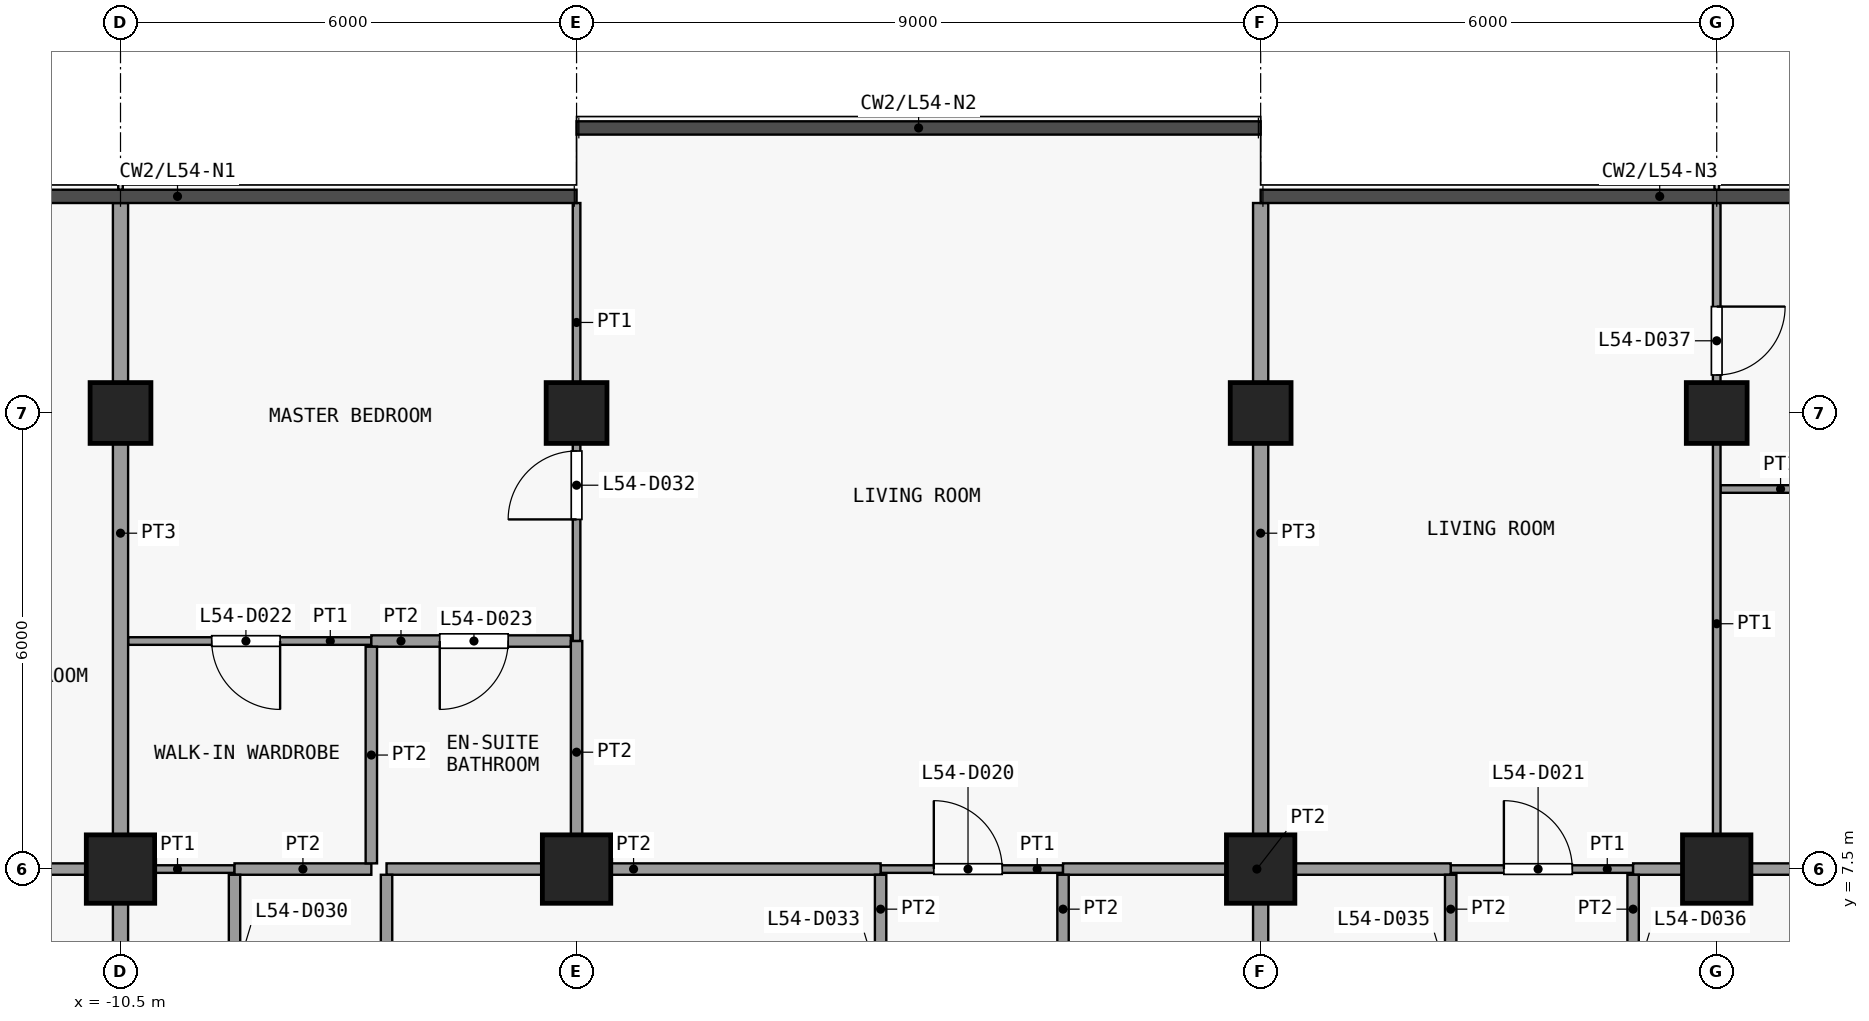
"""IFC4 building model, lengths in metres.
Left out: names, types, materials, properties, quantities, classifications, styles, units other than length and angle.
Written with IfcOpenShell. Run it as: python <this file> out.ifc"""

import sys

from ifc_helpers import new_model, si_unit, direction, frame, frame_2d, origin, origin_2d, place, context, subcontext, project, spatial, rectangle, extrude, element, fill, save


model = new_model("IFC4")
c1 = context("Model", 3, precision=1e-05, world=origin(), true_north=direction((0.0, 1.0)))
c2 = subcontext(c1, "Body", "Model", "MODEL_VIEW")
j1 = project(units=[si_unit("LENGTHUNIT", "METRE"), si_unit("PLANEANGLEUNIT", "RADIAN")], contexts=[c1])
p1 = place(None, origin())
s1 = spatial("IfcSite", under=j1, at=p1, CompositionType="ELEMENT")
p2 = place(p1, origin())
s2 = spatial("IfcBuilding", under=s1, at=p2, CompositionType="ELEMENT")
p3 = place(p2, frame((0.0, 0.0, 215.9)))
s3 = spatial("IfcBuildingStorey", under=s2, at=p3, CompositionType="ELEMENT", Elevation=215.9)
p4 = place(p3, frame((-10.5, 7.5, 0.0), z_axis=(0.0, 0.0, 1.0), x_axis=(1.0, 0.0, 0.0)))
e1 = element("IfcColumn", 1, at=p4, inside=s3, PredefinedType="COLUMN", context=c2, shape_type="SweptSolid", body=[
    extrude(rectangle(XDim=0.9, YDim=0.9, at=origin_2d()), origin(), (0.0, 0.0, 1.0), 3.6),
])
p5 = place(p3, frame((-10.5, 13.5, 0.0), z_axis=(0.0, 0.0, 1.0), x_axis=(1.0, 0.0, 0.0)))
e2 = element("IfcColumn", 2, at=p5, inside=s3, PredefinedType="COLUMN", context=c2, shape_type="SweptSolid", body=[
    extrude(rectangle(XDim=0.8, YDim=0.8, at=origin_2d()), origin(), (0.0, 0.0, 1.0), 3.6),
])
p6 = place(p3, frame((-4.5, 7.5, 0.0), z_axis=(0.0, 0.0, 1.0), x_axis=(1.0, 0.0, 0.0)))
e3 = element("IfcColumn", 3, at=p6, inside=s3, PredefinedType="COLUMN", context=c2, shape_type="SweptSolid", body=[
    extrude(rectangle(XDim=0.9, YDim=0.9, at=origin_2d()), origin(), (0.0, 0.0, 1.0), 3.6),
])
p7 = place(p3, frame((-4.5, 13.5, 0.0), z_axis=(0.0, 0.0, 1.0), x_axis=(1.0, 0.0, 0.0)))
e4 = element("IfcColumn", 4, at=p7, inside=s3, PredefinedType="COLUMN", context=c2, shape_type="SweptSolid", body=[
    extrude(rectangle(XDim=0.8, YDim=0.8, at=origin_2d()), origin(), (0.0, 0.0, 1.0), 3.6),
])
p8 = place(p3, frame((4.5, 7.5, 0.0), z_axis=(0.0, 0.0, 1.0), x_axis=(1.0, 0.0, 0.0)))
e5 = element("IfcColumn", 5, at=p8, inside=s3, PredefinedType="COLUMN", context=c2, shape_type="SweptSolid", body=[
    extrude(rectangle(XDim=0.9, YDim=0.9, at=origin_2d()), origin(), (0.0, 0.0, 1.0), 3.6),
])
p9 = place(p3, frame((4.5, 13.5, 0.0), z_axis=(0.0, 0.0, 1.0), x_axis=(1.0, 0.0, 0.0)))
e6 = element("IfcColumn", 6, at=p9, inside=s3, PredefinedType="COLUMN", context=c2, shape_type="SweptSolid", body=[
    extrude(rectangle(XDim=0.8, YDim=0.8, at=origin_2d()), origin(), (0.0, 0.0, 1.0), 3.6),
])
p10 = place(p3, frame((10.5, 7.5, 0.0), z_axis=(0.0, 0.0, 1.0), x_axis=(1.0, 0.0, 0.0)))
e7 = element("IfcColumn", 7, at=p10, inside=s3, PredefinedType="COLUMN", context=c2, shape_type="SweptSolid", body=[
    extrude(rectangle(XDim=0.9, YDim=0.9, at=origin_2d()), origin(), (0.0, 0.0, 1.0), 3.6),
])
p11 = place(p3, frame((10.5, 13.5, 0.0), z_axis=(0.0, 0.0, 1.0), x_axis=(1.0, 0.0, 0.0)))
e8 = element("IfcColumn", 8, at=p11, inside=s3, PredefinedType="COLUMN", context=c2, shape_type="SweptSolid", body=[
    extrude(rectangle(XDim=0.8, YDim=0.8, at=origin_2d()), origin(), (0.0, 0.0, 1.0), 3.6),
])
p12 = place(p3, frame((-10.5, 7.5, 0.0), z_axis=(0.0, 0.0, 1.0), x_axis=(1.0, 0.0, 0.0)))
e9 = element("IfcWall", 9, at=p12, inside=s3, PredefinedType="PARTITIONING", context=c2, shape_type="SweptSolid", body=[
    extrude(rectangle(XDim=1.5, YDim=0.1, at=frame_2d((0.75, 0.0))), origin(), (0.0, 0.0, 1.0), 3.3),
])
p13 = place(p3, frame((-0.5, 7.5, 0.0), z_axis=(0.0, 0.0, 1.0), x_axis=(1.0, 0.0, 0.0)))
e10 = element("IfcWall", 10, at=p13, inside=s3, PredefinedType="PARTITIONING", context=c2, shape_type="SweptSolid", body=[
    extrude(rectangle(XDim=2.4, YDim=0.1, at=frame_2d((1.2, 0.0))), origin(), (0.0, 0.0, 1.0), 3.3),
])
p14 = place(p13, frame((0.7, 0.0, 0.0)))
e11 = element("IfcOpeningElement", 11, at=p14, cuts=e10, PredefinedType="OPENING", context=c2, shape_type="SweptSolid", body=[
    extrude(rectangle(XDim=0.9, YDim=2.1, at=frame_2d((0.45, 1.05))), frame((0.0, 0.06, 0.0), z_axis=(0.0, -1.0, 0.0), x_axis=(1.0, 0.0, 0.0)), (0.0, 0.0, 1.0), 0.12),
])
p15 = place(p3, frame((7.0, 7.5, 0.0), z_axis=(0.0, 0.0, 1.0), x_axis=(1.0, 0.0, 0.0)))
e12 = element("IfcWall", 12, at=p15, inside=s3, PredefinedType="PARTITIONING", context=c2, shape_type="SweptSolid", body=[
    extrude(rectangle(XDim=2.4, YDim=0.1, at=frame_2d((1.2, 0.0))), origin(), (0.0, 0.0, 1.0), 3.3),
])
p16 = place(p15, frame((0.7, 0.0, 0.0)))
e13 = element("IfcOpeningElement", 13, at=p16, cuts=e12, PredefinedType="OPENING", context=c2, shape_type="SweptSolid", body=[
    extrude(rectangle(XDim=0.9, YDim=2.1, at=frame_2d((0.45, 1.05))), frame((0.0, 0.06, 0.0), z_axis=(0.0, -1.0, 0.0), x_axis=(1.0, 0.0, 0.0)), (0.0, 0.0, 1.0), 0.12),
])
p17 = place(p3, frame((-13.1, 7.5, 0.0), z_axis=(0.0, 0.0, 1.0), x_axis=(1.0, 0.0, 0.0)))
e14 = element("IfcWall", 14, at=p17, inside=s3, PredefinedType="PARTITIONING", context=c2, shape_type="SweptSolid", body=[
    extrude(rectangle(XDim=2.6, YDim=0.15, at=frame_2d((1.3, 0.0))), origin(), (0.0, 0.0, 1.0), 3.3),
])
p18 = place(p3, frame((-9.0, 7.5, 0.0), z_axis=(0.0, 0.0, 1.0), x_axis=(1.0, 0.0, 0.0)))
e15 = element("IfcWall", 15, at=p18, inside=s3, PredefinedType="PARTITIONING", context=c2, shape_type="SweptSolid", body=[
    extrude(rectangle(XDim=1.8, YDim=0.15, at=frame_2d((0.9, 0.0))), origin(), (0.0, 0.0, 1.0), 3.3),
])
p19 = place(p3, frame((-7.0, 7.5, 0.0), z_axis=(0.0, 0.0, 1.0), x_axis=(1.0, 0.0, 0.0)))
e16 = element("IfcWall", 16, at=p19, inside=s3, PredefinedType="PARTITIONING", context=c2, shape_type="SweptSolid", body=[
    extrude(rectangle(XDim=6.5, YDim=0.15, at=frame_2d((3.25, 0.0))), origin(), (0.0, 0.0, 1.0), 3.3),
])
p20 = place(p3, frame((1.9, 7.5, 0.0), z_axis=(0.0, 0.0, 1.0), x_axis=(1.0, 0.0, 0.0)))
e17 = element("IfcWall", 17, at=p20, inside=s3, PredefinedType="PARTITIONING", context=c2, shape_type="SweptSolid", body=[
    extrude(rectangle(XDim=5.1, YDim=0.15, at=frame_2d((2.55, 0.0))), origin(), (0.0, 0.0, 1.0), 3.3),
])
p21 = place(p3, frame((9.4, 7.5, 0.0), z_axis=(0.0, 0.0, 1.0), x_axis=(1.0, 0.0, 0.0)))
e18 = element("IfcWall", 18, at=p21, inside=s3, PredefinedType="PARTITIONING", context=c2, shape_type="SweptSolid", body=[
    extrude(rectangle(XDim=8.25, YDim=0.15, at=frame_2d((4.125, 0.0))), origin(), (0.0, 0.0, 1.0), 3.3),
])
p22 = place(p3, frame((-10.4, 10.5, 0.0), z_axis=(0.0, 0.0, 1.0), x_axis=(1.0, 0.0, 0.0)))
e19 = element("IfcWall", 19, at=p22, inside=s3, PredefinedType="PARTITIONING", context=c2, shape_type="SweptSolid", body=[
    extrude(rectangle(XDim=3.2, YDim=0.1, at=frame_2d((1.6, 0.0))), origin(), (0.0, 0.0, 1.0), 3.3),
])
p23 = place(p22, frame((1.1, 0.0, 0.0)))
e20 = element("IfcOpeningElement", 20, at=p23, cuts=e19, PredefinedType="OPENING", context=c2, shape_type="SweptSolid", body=[
    extrude(rectangle(XDim=0.9, YDim=2.1, at=frame_2d((0.45, 1.05))), frame((0.0, 0.06, 0.0), z_axis=(0.0, -1.0, 0.0), x_axis=(1.0, 0.0, 0.0)), (0.0, 0.0, 1.0), 0.12),
])
p24 = place(p3, frame((-7.2, 10.5, 0.0), z_axis=(0.0, 0.0, 1.0), x_axis=(1.0, 0.0, 0.0)))
e21 = element("IfcWall", 21, at=p24, inside=s3, PredefinedType="PARTITIONING", context=c2, shape_type="SweptSolid", body=[
    extrude(rectangle(XDim=2.625, YDim=0.15, at=frame_2d((1.312, 0.0))), origin(), (0.0, 0.0, 1.0), 3.3),
])
p25 = place(p24, frame((0.9, 0.0, 0.0)))
e22 = element("IfcOpeningElement", 22, at=p25, cuts=e21, PredefinedType="OPENING", context=c2, shape_type="SweptSolid", body=[
    extrude(rectangle(XDim=0.9, YDim=2.1, at=frame_2d((0.45, 1.05))), frame((0.0, 0.085, 0.0), z_axis=(0.0, -1.0, 0.0), x_axis=(1.0, 0.0, 0.0)), (0.0, 0.0, 1.0), 0.17),
])
p26 = place(p3, frame((10.55, 12.5, 0.0), z_axis=(0.0, 0.0, 1.0), x_axis=(1.0, 0.0, 0.0)))
e23 = element("IfcWall", 23, at=p26, inside=s3, PredefinedType="PARTITIONING", context=c2, shape_type="SweptSolid", body=[
    extrude(rectangle(XDim=4.3, YDim=0.1, at=frame_2d((2.15, 0.0))), origin(), (0.0, 0.0, 1.0), 3.3),
])
p27 = place(p26, frame((1.7, 0.0, 0.0)))
e24 = element("IfcOpeningElement", 24, at=p27, cuts=e23, PredefinedType="OPENING", context=c2, shape_type="SweptSolid", body=[
    extrude(rectangle(XDim=0.9, YDim=2.1, at=frame_2d((0.45, 1.05))), frame((0.0, 0.06, 0.0), z_axis=(0.0, -1.0, 0.0), x_axis=(1.0, 0.0, 0.0)), (0.0, 0.0, 1.0), 0.12),
])
p28 = place(p3, frame((-10.5, 4.6, 0.0), z_axis=(0.0, 0.0, 1.0), x_axis=(0.0, 1.0, 0.0)))
e25 = element("IfcWall", 25, at=p28, inside=s3, PredefinedType="PARTITIONING", context=c2, shape_type="SweptSolid", body=[
    extrude(rectangle(XDim=2.825, YDim=0.2, at=frame_2d((1.413, 0.0))), origin(), (0.0, 0.0, 1.0), 3.3),
])
p29 = place(p3, frame((-10.5, 7.575, 0.0), z_axis=(0.0, 0.0, 1.0), x_axis=(0.0, 1.0, 0.0)))
e26 = element("IfcWall", 26, at=p29, inside=s3, PredefinedType="PARTITIONING", context=c2, shape_type="SweptSolid", body=[
    extrude(rectangle(XDim=8.688, YDim=0.2, at=frame_2d((4.344, 0.0))), origin(), (0.0, 0.0, 1.0), 3.3),
])
p30 = place(p3, frame((-9.0, 4.6, 0.0), z_axis=(0.0, 0.0, 1.0), x_axis=(0.0, 1.0, 0.0)))
e27 = element("IfcWall", 27, at=p30, inside=s3, PredefinedType="PARTITIONING", context=c2, shape_type="SweptSolid", body=[
    extrude(rectangle(XDim=2.825, YDim=0.15, at=frame_2d((1.413, 0.0))), origin(), (0.0, 0.0, 1.0), 3.3),
])
p31 = place(p30, frame((1.0, 0.0, 0.0)))
e28 = element("IfcOpeningElement", 28, at=p31, cuts=e27, PredefinedType="OPENING", context=c2, shape_type="SweptSolid", body=[
    extrude(rectangle(XDim=0.9, YDim=2.1, at=frame_2d((0.45, 1.05))), frame((0.0, 0.085, 0.0), z_axis=(0.0, -1.0, 0.0), x_axis=(1.0, 0.0, 0.0)), (0.0, 0.0, 1.0), 0.17),
])
p32 = place(p3, frame((-7.2, 7.575, 0.0), z_axis=(0.0, 0.0, 1.0), x_axis=(0.0, 1.0, 0.0)))
e29 = element("IfcWall", 29, at=p32, inside=s3, PredefinedType="PARTITIONING", context=c2, shape_type="SweptSolid", body=[
    extrude(rectangle(XDim=2.85, YDim=0.15, at=frame_2d((1.425, 0.0))), origin(), (0.0, 0.0, 1.0), 3.3),
])
p33 = place(p3, frame((-7.0, 4.6, 0.0), z_axis=(0.0, 0.0, 1.0), x_axis=(0.0, 1.0, 0.0)))
e30 = element("IfcWall", 30, at=p33, inside=s3, PredefinedType="PARTITIONING", context=c2, shape_type="SweptSolid", body=[
    extrude(rectangle(XDim=2.825, YDim=0.15, at=frame_2d((1.413, 0.0))), origin(), (0.0, 0.0, 1.0), 3.3),
])
p34 = place(p33, frame((1.0, 0.0, 0.0)))
e31 = element("IfcOpeningElement", 31, at=p34, cuts=e30, PredefinedType="OPENING", context=c2, shape_type="SweptSolid", body=[
    extrude(rectangle(XDim=0.9, YDim=2.1, at=frame_2d((0.45, 1.05))), frame((0.0, 0.085, 0.0), z_axis=(0.0, -1.0, 0.0), x_axis=(1.0, 0.0, 0.0)), (0.0, 0.0, 1.0), 0.17),
])
p35 = place(p3, frame((-4.5, 10.5, 0.0), z_axis=(0.0, 0.0, 1.0), x_axis=(0.0, 1.0, 0.0)))
e32 = element("IfcWall", 32, at=p35, inside=s3, PredefinedType="PARTITIONING", context=c2, shape_type="SweptSolid", body=[
    extrude(rectangle(XDim=5.762, YDim=0.1, at=frame_2d((2.881, 0.0))), origin(), (0.0, 0.0, 1.0), 3.3),
])
p36 = place(p35, frame((1.6, 0.0, 0.0)))
e33 = element("IfcOpeningElement", 33, at=p36, cuts=e32, PredefinedType="OPENING", context=c2, shape_type="SweptSolid", body=[
    extrude(rectangle(XDim=0.9, YDim=2.1, at=frame_2d((0.45, 1.05))), frame((0.0, 0.06, 0.0), z_axis=(0.0, -1.0, 0.0), x_axis=(1.0, 0.0, 0.0)), (0.0, 0.0, 1.0), 0.12),
])
p37 = place(p3, frame((-4.5, 7.575, 0.0), z_axis=(0.0, 0.0, 1.0), x_axis=(0.0, 1.0, 0.0)))
e34 = element("IfcWall", 34, at=p37, inside=s3, PredefinedType="PARTITIONING", context=c2, shape_type="SweptSolid", body=[
    extrude(rectangle(XDim=2.925, YDim=0.15, at=frame_2d((1.462, 0.0))), origin(), (0.0, 0.0, 1.0), 3.3),
])
p38 = place(p3, frame((-0.5, 4.6, 0.0), z_axis=(0.0, 0.0, 1.0), x_axis=(0.0, 1.0, 0.0)))
e35 = element("IfcWall", 35, at=p38, inside=s3, PredefinedType="PARTITIONING", context=c2, shape_type="SweptSolid", body=[
    extrude(rectangle(XDim=2.825, YDim=0.15, at=frame_2d((1.413, 0.0))), origin(), (0.0, 0.0, 1.0), 3.3),
])
p39 = place(p38, frame((0.9, 0.0, 0.0)))
e36 = element("IfcOpeningElement", 36, at=p39, cuts=e35, PredefinedType="OPENING", context=c2, shape_type="SweptSolid", body=[
    extrude(rectangle(XDim=0.9, YDim=2.1, at=frame_2d((0.45, 1.05))), frame((0.0, 0.085, 0.0), z_axis=(0.0, -1.0, 0.0), x_axis=(1.0, 0.0, 0.0)), (0.0, 0.0, 1.0), 0.17),
])
p40 = place(p3, frame((1.9, 4.6, 0.0), z_axis=(0.0, 0.0, 1.0), x_axis=(0.0, 1.0, 0.0)))
e37 = element("IfcWall", 37, at=p40, inside=s3, PredefinedType="PARTITIONING", context=c2, shape_type="SweptSolid", body=[
    extrude(rectangle(XDim=2.825, YDim=0.15, at=frame_2d((1.413, 0.0))), origin(), (0.0, 0.0, 1.0), 3.3),
])
p41 = place(p40, frame((0.9, 0.0, 0.0)))
e38 = element("IfcOpeningElement", 38, at=p41, cuts=e37, PredefinedType="OPENING", context=c2, shape_type="SweptSolid", body=[
    extrude(rectangle(XDim=0.9, YDim=2.1, at=frame_2d((0.45, 1.05))), frame((0.0, 0.085, 0.0), z_axis=(0.0, -1.0, 0.0), x_axis=(1.0, 0.0, 0.0)), (0.0, 0.0, 1.0), 0.17),
])
p42 = place(p3, frame((4.5, 4.6, 0.0), z_axis=(0.0, 0.0, 1.0), x_axis=(0.0, 1.0, 0.0)))
e39 = element("IfcWall", 39, at=p42, inside=s3, PredefinedType="PARTITIONING", context=c2, shape_type="SweptSolid", body=[
    extrude(rectangle(XDim=2.825, YDim=0.2, at=frame_2d((1.413, 0.0))), origin(), (0.0, 0.0, 1.0), 3.3),
])
p43 = place(p3, frame((4.5, 7.575, 0.0), z_axis=(0.0, 0.0, 1.0), x_axis=(0.0, 1.0, 0.0)))
e40 = element("IfcWall", 40, at=p43, inside=s3, PredefinedType="PARTITIONING", context=c2, shape_type="SweptSolid", body=[
    extrude(rectangle(XDim=8.688, YDim=0.2, at=frame_2d((4.344, 0.0))), origin(), (0.0, 0.0, 1.0), 3.3),
])
p44 = place(p3, frame((7.0, 4.6, 0.0), z_axis=(0.0, 0.0, 1.0), x_axis=(0.0, 1.0, 0.0)))
e41 = element("IfcWall", 41, at=p44, inside=s3, PredefinedType="PARTITIONING", context=c2, shape_type="SweptSolid", body=[
    extrude(rectangle(XDim=2.825, YDim=0.15, at=frame_2d((1.413, 0.0))), origin(), (0.0, 0.0, 1.0), 3.3),
])
p45 = place(p44, frame((0.9, 0.0, 0.0)))
e42 = element("IfcOpeningElement", 42, at=p45, cuts=e41, PredefinedType="OPENING", context=c2, shape_type="SweptSolid", body=[
    extrude(rectangle(XDim=0.9, YDim=2.1, at=frame_2d((0.45, 1.05))), frame((0.0, 0.085, 0.0), z_axis=(0.0, -1.0, 0.0), x_axis=(1.0, 0.0, 0.0)), (0.0, 0.0, 1.0), 0.17),
])
p46 = place(p3, frame((9.4, 4.6, 0.0), z_axis=(0.0, 0.0, 1.0), x_axis=(0.0, 1.0, 0.0)))
e43 = element("IfcWall", 43, at=p46, inside=s3, PredefinedType="PARTITIONING", context=c2, shape_type="SweptSolid", body=[
    extrude(rectangle(XDim=2.825, YDim=0.15, at=frame_2d((1.413, 0.0))), origin(), (0.0, 0.0, 1.0), 3.3),
])
p47 = place(p46, frame((0.9, 0.0, 0.0)))
e44 = element("IfcOpeningElement", 44, at=p47, cuts=e43, PredefinedType="OPENING", context=c2, shape_type="SweptSolid", body=[
    extrude(rectangle(XDim=0.9, YDim=2.1, at=frame_2d((0.45, 1.05))), frame((0.0, 0.085, 0.0), z_axis=(0.0, -1.0, 0.0), x_axis=(1.0, 0.0, 0.0)), (0.0, 0.0, 1.0), 0.17),
])
p48 = place(p3, frame((10.5, 7.575, 0.0), z_axis=(0.0, 0.0, 1.0), x_axis=(0.0, 1.0, 0.0)))
e45 = element("IfcWall", 45, at=p48, inside=s3, PredefinedType="PARTITIONING", context=c2, shape_type="SweptSolid", body=[
    extrude(rectangle(XDim=8.688, YDim=0.1, at=frame_2d((4.344, 0.0))), origin(), (0.0, 0.0, 1.0), 3.3),
])
p49 = place(p48, frame((6.425, 0.0, 0.0)))
e46 = element("IfcOpeningElement", 46, at=p49, cuts=e45, PredefinedType="OPENING", context=c2, shape_type="SweptSolid", body=[
    extrude(rectangle(XDim=0.9, YDim=2.1, at=frame_2d((0.45, 1.05))), frame((0.0, 0.06, 0.0), z_axis=(0.0, -1.0, 0.0), x_axis=(1.0, 0.0, 0.0)), (0.0, 0.0, 1.0), 0.12),
])
p50 = place(p14, origin())
e47 = element("IfcDoor", 47, at=p50, inside=s3, OperationType="SINGLE_SWING_RIGHT", PredefinedType="DOOR", context=c2, shape_type="SweptSolid", body=[
    extrude(rectangle(XDim=0.9, YDim=2.1, at=frame_2d((0.45, 1.05))), frame((0.0, 0.025, 0.0), z_axis=(0.0, -1.0, 0.0), x_axis=(1.0, 0.0, 0.0)), (0.0, 0.0, 1.0), 0.05),
])
fill(e11, e47)
p51 = place(p16, origin())
e48 = element("IfcDoor", 48, at=p51, inside=s3, OperationType="SINGLE_SWING_RIGHT", PredefinedType="DOOR", context=c2, shape_type="SweptSolid", body=[
    extrude(rectangle(XDim=0.9, YDim=2.1, at=frame_2d((0.45, 1.05))), frame((0.0, 0.025, 0.0), z_axis=(0.0, -1.0, 0.0), x_axis=(1.0, 0.0, 0.0)), (0.0, 0.0, 1.0), 0.05),
])
fill(e13, e48)
p52 = place(p23, origin())
e49 = element("IfcDoor", 49, at=p52, inside=s3, OperationType="SINGLE_SWING_RIGHT", PredefinedType="DOOR", context=c2, shape_type="SweptSolid", body=[
    extrude(rectangle(XDim=0.9, YDim=2.1, at=frame_2d((0.45, 1.05))), frame((0.0, 0.025, 0.0), z_axis=(0.0, -1.0, 0.0), x_axis=(1.0, 0.0, 0.0)), (0.0, 0.0, 1.0), 0.05),
])
fill(e20, e49)
p53 = place(p25, origin())
e50 = element("IfcDoor", 50, at=p53, inside=s3, OperationType="SINGLE_SWING_LEFT", PredefinedType="DOOR", context=c2, shape_type="SweptSolid", body=[
    extrude(rectangle(XDim=0.9, YDim=2.1, at=frame_2d((0.45, 1.05))), frame((0.0, 0.025, 0.0), z_axis=(0.0, -1.0, 0.0), x_axis=(1.0, 0.0, 0.0)), (0.0, 0.0, 1.0), 0.05),
])
fill(e22, e50)
p54 = place(p36, origin())
e51 = element("IfcDoor", 51, at=p54, inside=s3, OperationType="SINGLE_SWING_RIGHT", PredefinedType="DOOR", context=c2, shape_type="SweptSolid", body=[
    extrude(rectangle(XDim=0.9, YDim=2.1, at=frame_2d((0.45, 1.05))), frame((0.0, 0.025, 0.0), z_axis=(0.0, -1.0, 0.0), x_axis=(1.0, 0.0, 0.0)), (0.0, 0.0, 1.0), 0.05),
])
fill(e33, e51)
p55 = place(p49, origin())
e52 = element("IfcDoor", 52, at=p55, inside=s3, OperationType="SINGLE_SWING_RIGHT", PredefinedType="DOOR", context=c2, shape_type="SweptSolid", body=[
    extrude(rectangle(XDim=0.9, YDim=2.1, at=frame_2d((0.45, 1.05))), frame((0.0, 0.025, 0.0), z_axis=(0.0, -1.0, 0.0), x_axis=(1.0, 0.0, 0.0)), (0.0, 0.0, 1.0), 0.05),
])
fill(e46, e52)
save(model, sys.argv[1])
